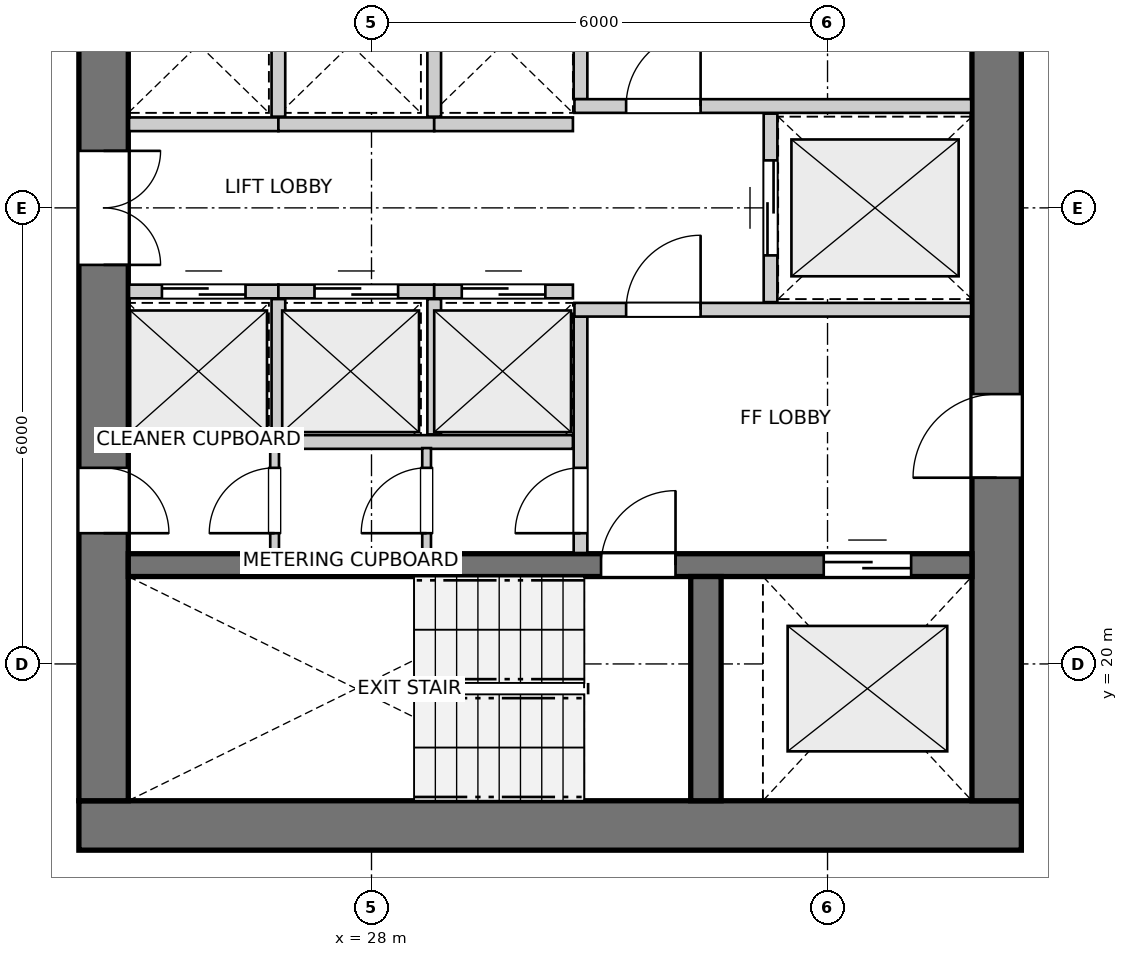
"""IFC4 building model, lengths in metres.
Left out: names, types, materials, properties, quantities, classifications, styles, units other than length and angle.
Written with IfcOpenShell. Run it as: python <this file> out.ifc"""

import sys

from ifc_helpers import new_model, si_unit, direction, frame, frame_2d, origin, place, context, subcontext, project, spatial, rectangle, extrude, source, transform, mapped, element, fill, save


model = new_model("IFC4")
c1 = context("Model", 3, precision=1e-05, world=origin(), true_north=direction((0.0, 1.0)))
c2 = subcontext(c1, "Body", "Model", "MODEL_VIEW")
j1 = project(units=[si_unit("LENGTHUNIT", "METRE"), si_unit("PLANEANGLEUNIT", "RADIAN")], contexts=[c1])
p1 = place(None, origin())
s1 = spatial("IfcSite", under=j1, at=p1, CompositionType="ELEMENT")
p2 = place(p1, origin())
s2 = spatial("IfcBuilding", under=s1, at=p2, CompositionType="ELEMENT")
p3 = place(p2, frame((0.0, 0.0, 121.6)))
s3 = spatial("IfcBuildingStorey", under=s2, at=p3, CompositionType="ELEMENT", Elevation=121.6)
p4 = place(p3, frame((24.15, 17.875, 0.0), z_axis=(0.0, 0.0, 1.0), x_axis=(1.0, 0.0, 0.0)))
e1 = element("IfcWall", 1, at=p4, inside=s3, PredefinedType="SHEAR", context=c2, shape_type="SweptSolid", body=[
    extrude(rectangle(XDim=12.4, YDim=0.65, at=frame_2d((6.2, 0.0))), origin(), (0.0, 0.0, 1.0), 2.95),
])
p5 = place(p3, frame((24.475, 33.8, 0.0), z_axis=(0.0, 0.0, 1.0), x_axis=(0.0, -1.0, 0.0)))
e2 = element("IfcWall", 2, at=p5, inside=s3, PredefinedType="SHEAR", context=c2, shape_type="SweptSolid", body=[
    extrude(rectangle(XDim=15.6, YDim=0.65, at=frame_2d((7.8, 0.0))), origin(), (0.0, 0.0, 1.0), 2.95),
])
p6 = place(p5, frame((7.05, 0.0, 0.0)))
e3 = element("IfcOpeningElement", 3, at=p6, cuts=e2, PredefinedType="OPENING", context=c2, shape_type="SweptSolid", body=[
    extrude(rectangle(XDim=1.5, YDim=2.15, at=frame_2d((0.75, 1.075))), frame((0.0, 0.335, 0.0), z_axis=(0.0, -1.0, 0.0), x_axis=(1.0, 0.0, 0.0)), (0.0, 0.0, 1.0), 0.67),
])
p7 = place(p5, frame((3.52, 0.0, 0.0)))
e4 = element("IfcOpeningElement", 4, at=p7, cuts=e2, PredefinedType="OPENING", context=c2, shape_type="SweptSolid", body=[
    extrude(rectangle(XDim=0.86, YDim=2.05, at=frame_2d((0.43, 1.025))), frame((0.0, 0.335, 0.0), z_axis=(0.0, -1.0, 0.0), x_axis=(1.0, 0.0, 0.0)), (0.0, 0.0, 1.0), 0.67),
])
p8 = place(p5, frame((11.22, 0.0, 0.0)))
e5 = element("IfcOpeningElement", 5, at=p8, cuts=e2, PredefinedType="OPENING", context=c2, shape_type="SweptSolid", body=[
    extrude(rectangle(XDim=0.86, YDim=2.05, at=frame_2d((0.43, 1.025))), frame((0.0, 0.335, 0.0), z_axis=(0.0, -1.0, 0.0), x_axis=(1.0, 0.0, 0.0)), (0.0, 0.0, 1.0), 0.67),
])
p9 = place(p3, frame((36.225, 18.2, 0.0), z_axis=(0.0, 0.0, 1.0), x_axis=(0.0, 1.0, 0.0)))
e6 = element("IfcWall", 6, at=p9, inside=s3, PredefinedType="SHEAR", context=c2, shape_type="SweptSolid", body=[
    extrude(rectangle(XDim=15.6, YDim=0.65, at=frame_2d((7.8, 0.0))), origin(), (0.0, 0.0, 1.0), 2.95),
])
p10 = place(p9, frame((4.25, 0.0, 0.0)))
e7 = element("IfcOpeningElement", 7, at=p10, cuts=e6, PredefinedType="OPENING", context=c2, shape_type="SweptSolid", body=[
    extrude(rectangle(XDim=1.1, YDim=2.15, at=frame_2d((0.55, 1.075))), frame((0.0, 0.335, 0.0), z_axis=(0.0, -1.0, 0.0), x_axis=(1.0, 0.0, 0.0)), (0.0, 0.0, 1.0), 0.67),
])
p11 = place(p9, frame((10.25, 0.0, 0.0)))
e8 = element("IfcOpeningElement", 8, at=p11, cuts=e6, PredefinedType="OPENING", context=c2, shape_type="SweptSolid", body=[
    extrude(rectangle(XDim=1.1, YDim=2.15, at=frame_2d((0.55, 1.075))), frame((0.0, 0.335, 0.0), z_axis=(0.0, -1.0, 0.0), x_axis=(1.0, 0.0, 0.0)), (0.0, 0.0, 1.0), 0.67),
])
p12 = place(p3, frame((24.8, 21.3, 0.0), z_axis=(0.0, 0.0, 1.0), x_axis=(1.0, 0.0, 0.0)))
e9 = element("IfcWall", 9, at=p12, inside=s3, PredefinedType="SHEAR", context=c2, shape_type="SweptSolid", body=[
    extrude(rectangle(XDim=11.1, YDim=0.3, at=frame_2d((5.55, 0.0))), origin(), (0.0, 0.0, 1.0), 2.95),
])
p13 = place(p12, frame((6.22, 0.0, 0.0)))
e10 = element("IfcOpeningElement", 10, at=p13, cuts=e9, PredefinedType="OPENING", context=c2, shape_type="SweptSolid", body=[
    extrude(rectangle(XDim=0.98, YDim=2.15, at=frame_2d((0.49, 1.075))), frame((0.0, 0.16, 0.0), z_axis=(0.0, -1.0, 0.0), x_axis=(1.0, 0.0, 0.0)), (0.0, 0.0, 1.0), 0.32),
])
p14 = place(p12, frame((9.15, 0.0, 0.0)))
e11 = element("IfcOpeningElement", 11, at=p14, cuts=e9, PredefinedType="OPENING", context=c2, shape_type="SweptSolid", body=[
    extrude(rectangle(XDim=1.15, YDim=2.15, at=frame_2d((0.575, 1.075))), frame((0.0, 0.16, 0.0), z_axis=(0.0, -1.0, 0.0), x_axis=(1.0, 0.0, 0.0)), (0.0, 0.0, 1.0), 0.32),
])
p15 = place(p3, frame((32.4, 18.2, 0.0), z_axis=(0.0, 0.0, 1.0), x_axis=(0.0, 1.0, 0.0)))
e12 = element("IfcWall", 12, at=p15, inside=s3, PredefinedType="SHEAR", context=c2, shape_type="SweptSolid", body=[
    extrude(rectangle(XDim=2.95, YDim=0.4, at=frame_2d((1.475, 0.0))), origin(), (0.0, 0.0, 1.0), 2.95),
])
p16 = place(p3, frame((30.75, 21.46, 0.0), z_axis=(0.0, 0.0, 1.0), x_axis=(0.0, 1.0, 0.0)))
e13 = element("IfcWall", 13, at=p16, inside=s3, PredefinedType="PARTITIONING", context=c2, shape_type="SweptSolid", body=[
    extrude(rectangle(XDim=3.11, YDim=0.18, at=frame_2d((1.555, 0.0))), origin(), (0.0, 0.0, 1.0), 2.95),
])
p17 = place(p16, frame((0.26, 0.0, 0.0)))
e14 = element("IfcOpeningElement", 14, at=p17, cuts=e13, PredefinedType="OPENING", context=c2, shape_type="SweptSolid", body=[
    extrude(rectangle(XDim=0.86, YDim=2.05, at=frame_2d((0.43, 1.025))), frame((0.0, 0.1, 0.0), z_axis=(0.0, -1.0, 0.0), x_axis=(1.0, 0.0, 0.0)), (0.0, 0.0, 1.0), 0.2),
])
p18 = place(p3, frame((30.67, 24.66, 0.0), z_axis=(0.0, 0.0, 1.0), x_axis=(1.0, 0.0, 0.0)))
e15 = element("IfcWall", 15, at=p18, inside=s3, PredefinedType="PARTITIONING", context=c2, shape_type="SweptSolid", body=[
    extrude(rectangle(XDim=5.22, YDim=0.18, at=frame_2d((2.61, 0.0))), origin(), (0.0, 0.0, 1.0), 2.95),
])
p19 = place(p18, frame((0.68, 0.0, 0.0)))
e16 = element("IfcOpeningElement", 16, at=p19, cuts=e15, PredefinedType="OPENING", context=c2, shape_type="SweptSolid", body=[
    extrude(rectangle(XDim=0.98, YDim=2.15, at=frame_2d((0.49, 1.075))), frame((0.0, 0.1, 0.0), z_axis=(0.0, -1.0, 0.0), x_axis=(1.0, 0.0, 0.0)), (0.0, 0.0, 1.0), 0.2),
])
p20 = place(p3, frame((30.75, 27.43, 0.0), z_axis=(0.0, 0.0, 1.0), x_axis=(0.0, 1.0, 0.0)))
e17 = element("IfcWall", 17, at=p20, inside=s3, PredefinedType="PARTITIONING", context=c2, shape_type="SweptSolid", body=[
    extrude(rectangle(XDim=3.11, YDim=0.18, at=frame_2d((1.555, 0.0))), origin(), (0.0, 0.0, 1.0), 2.95),
])
p21 = place(p20, frame((1.98, 0.0, 0.0)))
e18 = element("IfcOpeningElement", 18, at=p21, cuts=e17, PredefinedType="OPENING", context=c2, shape_type="SweptSolid", body=[
    extrude(rectangle(XDim=0.86, YDim=2.05, at=frame_2d((0.43, 1.025))), frame((0.0, 0.1, 0.0), z_axis=(0.0, -1.0, 0.0), x_axis=(1.0, 0.0, 0.0)), (0.0, 0.0, 1.0), 0.2),
])
p22 = place(p3, frame((30.67, 27.34, 0.0), z_axis=(0.0, 0.0, 1.0), x_axis=(1.0, 0.0, 0.0)))
e19 = element("IfcWall", 19, at=p22, inside=s3, PredefinedType="PARTITIONING", context=c2, shape_type="SweptSolid", body=[
    extrude(rectangle(XDim=5.22, YDim=0.18, at=frame_2d((2.61, 0.0))), origin(), (0.0, 0.0, 1.0), 2.95),
])
p23 = place(p22, frame((0.68, 0.0, 0.0)))
e20 = element("IfcOpeningElement", 20, at=p23, cuts=e19, PredefinedType="OPENING", context=c2, shape_type="SweptSolid", body=[
    extrude(rectangle(XDim=0.98, YDim=2.15, at=frame_2d((0.49, 1.075))), frame((0.0, 0.1, 0.0), z_axis=(0.0, -1.0, 0.0), x_axis=(1.0, 0.0, 0.0)), (0.0, 0.0, 1.0), 0.2),
])
p24 = place(p3, frame((33.25, 24.76, 0.0), z_axis=(0.0, 0.0, 1.0), x_axis=(0.0, 1.0, 0.0)))
e21 = element("IfcWall", 21, at=p24, inside=s3, PredefinedType="PARTITIONING", context=c2, shape_type="SweptSolid", body=[
    extrude(rectangle(XDim=2.48, YDim=0.18, at=frame_2d((1.24, 0.0))), origin(), (0.0, 0.0, 1.0), 2.95),
])
p25 = place(p24, frame((0.615, 0.0, 0.0)))
e22 = element("IfcOpeningElement", 22, at=p25, cuts=e21, PredefinedType="OPENING", context=c2, shape_type="SweptSolid", body=[
    extrude(rectangle(XDim=1.25, YDim=2.15, at=frame_2d((0.625, 1.075))), frame((0.0, 0.1, 0.0), z_axis=(0.0, -1.0, 0.0), x_axis=(1.0, 0.0, 0.0)), (0.0, 0.0, 1.0), 0.2),
])
p26 = place(p3, frame((24.81, 22.92, 0.0), z_axis=(0.0, 0.0, 1.0), x_axis=(1.0, 0.0, 0.0)))
e23 = element("IfcWall", 23, at=p26, inside=s3, PredefinedType="PARTITIONING", context=c2, shape_type="SweptSolid", body=[
    extrude(rectangle(XDim=5.84, YDim=0.18, at=frame_2d((2.92, 0.0))), origin(), (0.0, 0.0, 1.0), 2.95),
])
p27 = place(p3, frame((24.81, 24.9, 0.0), z_axis=(0.0, 0.0, 1.0), x_axis=(1.0, 0.0, 0.0)))
e24 = element("IfcWall", 24, at=p27, inside=s3, PredefinedType="PARTITIONING", context=c2, shape_type="SweptSolid", body=[
    extrude(rectangle(XDim=1.965, YDim=0.18, at=frame_2d((0.982, 0.0))), origin(), (0.0, 0.0, 1.0), 2.95),
])
p28 = place(p27, frame((0.433, 0.0, 0.0)))
e25 = element("IfcOpeningElement", 25, at=p28, cuts=e24, PredefinedType="OPENING", context=c2, shape_type="SweptSolid", body=[
    extrude(rectangle(XDim=1.1, YDim=2.15, at=frame_2d((0.55, 1.075))), frame((0.0, 0.1, 0.0), z_axis=(0.0, -1.0, 0.0), x_axis=(1.0, 0.0, 0.0)), (0.0, 0.0, 1.0), 0.2),
])
p29 = place(p3, frame((26.775, 24.9, 0.0), z_axis=(0.0, 0.0, 1.0), x_axis=(1.0, 0.0, 0.0)))
e26 = element("IfcWall", 26, at=p29, inside=s3, PredefinedType="PARTITIONING", context=c2, shape_type="SweptSolid", body=[
    extrude(rectangle(XDim=2.05, YDim=0.18, at=frame_2d((1.025, 0.0))), origin(), (0.0, 0.0, 1.0), 2.95),
])
p30 = place(p29, frame((0.475, 0.0, 0.0)))
e27 = element("IfcOpeningElement", 27, at=p30, cuts=e26, PredefinedType="OPENING", context=c2, shape_type="SweptSolid", body=[
    extrude(rectangle(XDim=1.1, YDim=2.15, at=frame_2d((0.55, 1.075))), frame((0.0, 0.1, 0.0), z_axis=(0.0, -1.0, 0.0), x_axis=(1.0, 0.0, 0.0)), (0.0, 0.0, 1.0), 0.2),
])
p31 = place(p3, frame((26.775, 23.02, 0.0), z_axis=(0.0, 0.0, 1.0), x_axis=(0.0, 1.0, 0.0)))
e28 = element("IfcWall", 28, at=p31, inside=s3, PredefinedType="PARTITIONING", context=c2, shape_type="SweptSolid", body=[
    extrude(rectangle(XDim=1.78, YDim=0.18, at=frame_2d((0.89, 0.0))), origin(), (0.0, 0.0, 1.0), 2.95),
])
p32 = place(p3, frame((28.825, 24.9, 0.0), z_axis=(0.0, 0.0, 1.0), x_axis=(1.0, 0.0, 0.0)))
e29 = element("IfcWall", 29, at=p32, inside=s3, PredefinedType="PARTITIONING", context=c2, shape_type="SweptSolid", body=[
    extrude(rectangle(XDim=1.825, YDim=0.18, at=frame_2d((0.913, 0.0))), origin(), (0.0, 0.0, 1.0), 2.95),
])
p33 = place(p32, frame((0.363, 0.0, 0.0)))
e30 = element("IfcOpeningElement", 30, at=p33, cuts=e29, PredefinedType="OPENING", context=c2, shape_type="SweptSolid", body=[
    extrude(rectangle(XDim=1.1, YDim=2.15, at=frame_2d((0.55, 1.075))), frame((0.0, 0.1, 0.0), z_axis=(0.0, -1.0, 0.0), x_axis=(1.0, 0.0, 0.0)), (0.0, 0.0, 1.0), 0.2),
])
p34 = place(p3, frame((28.825, 23.02, 0.0), z_axis=(0.0, 0.0, 1.0), x_axis=(0.0, 1.0, 0.0)))
e31 = element("IfcWall", 31, at=p34, inside=s3, PredefinedType="PARTITIONING", context=c2, shape_type="SweptSolid", body=[
    extrude(rectangle(XDim=1.78, YDim=0.18, at=frame_2d((0.89, 0.0))), origin(), (0.0, 0.0, 1.0), 2.95),
])
p35 = place(p3, frame((24.81, 27.1, 0.0), z_axis=(0.0, 0.0, 1.0), x_axis=(1.0, 0.0, 0.0)))
e32 = element("IfcWall", 32, at=p35, inside=s3, PredefinedType="PARTITIONING", context=c2, shape_type="SweptSolid", body=[
    extrude(rectangle(XDim=1.965, YDim=0.18, at=frame_2d((0.982, 0.0))), origin(), (0.0, 0.0, 1.0), 2.95),
])
p36 = place(p3, frame((26.775, 27.1, 0.0), z_axis=(0.0, 0.0, 1.0), x_axis=(1.0, 0.0, 0.0)))
e33 = element("IfcWall", 33, at=p36, inside=s3, PredefinedType="PARTITIONING", context=c2, shape_type="SweptSolid", body=[
    extrude(rectangle(XDim=2.05, YDim=0.18, at=frame_2d((1.025, 0.0))), origin(), (0.0, 0.0, 1.0), 2.95),
])
p37 = place(p3, frame((26.775, 27.2, 0.0), z_axis=(0.0, 0.0, 1.0), x_axis=(0.0, 1.0, 0.0)))
e34 = element("IfcWall", 34, at=p37, inside=s3, PredefinedType="PARTITIONING", context=c2, shape_type="SweptSolid", body=[
    extrude(rectangle(XDim=1.78, YDim=0.18, at=frame_2d((0.89, 0.0))), origin(), (0.0, 0.0, 1.0), 2.95),
])
p38 = place(p3, frame((28.825, 27.1, 0.0), z_axis=(0.0, 0.0, 1.0), x_axis=(1.0, 0.0, 0.0)))
e35 = element("IfcWall", 35, at=p38, inside=s3, PredefinedType="PARTITIONING", context=c2, shape_type="SweptSolid", body=[
    extrude(rectangle(XDim=1.825, YDim=0.18, at=frame_2d((0.913, 0.0))), origin(), (0.0, 0.0, 1.0), 2.95),
])
p39 = place(p3, frame((28.825, 27.2, 0.0), z_axis=(0.0, 0.0, 1.0), x_axis=(0.0, 1.0, 0.0)))
e36 = element("IfcWall", 36, at=p39, inside=s3, PredefinedType="PARTITIONING", context=c2, shape_type="SweptSolid", body=[
    extrude(rectangle(XDim=1.78, YDim=0.18, at=frame_2d((0.89, 0.0))), origin(), (0.0, 0.0, 1.0), 2.95),
])
p40 = place(p3, frame((26.725, 21.46, 0.0), z_axis=(0.0, 0.0, 1.0), x_axis=(0.0, 1.0, 0.0)))
e37 = element("IfcWall", 37, at=p40, inside=s3, PredefinedType="PARTITIONING", context=c2, shape_type="SweptSolid", body=[
    extrude(rectangle(XDim=1.38, YDim=0.115, at=frame_2d((0.69, 0.0))), origin(), (0.0, 0.0, 1.0), 2.95),
])
p41 = place(p40, frame((0.26, 0.0, 0.0)))
e38 = element("IfcOpeningElement", 38, at=p41, cuts=e37, PredefinedType="OPENING", context=c2, shape_type="SweptSolid", body=[
    extrude(rectangle(XDim=0.86, YDim=2.05, at=frame_2d((0.43, 1.025))), frame((0.0, 0.067, 0.0), z_axis=(0.0, -1.0, 0.0), x_axis=(1.0, 0.0, 0.0)), (0.0, 0.0, 1.0), 0.135),
])
p42 = place(p3, frame((28.725, 21.46, 0.0), z_axis=(0.0, 0.0, 1.0), x_axis=(0.0, 1.0, 0.0)))
e39 = element("IfcWall", 39, at=p42, inside=s3, PredefinedType="PARTITIONING", context=c2, shape_type="SweptSolid", body=[
    extrude(rectangle(XDim=1.38, YDim=0.115, at=frame_2d((0.69, 0.0))), origin(), (0.0, 0.0, 1.0), 2.95),
])
p43 = place(p42, frame((0.26, 0.0, 0.0)))
e40 = element("IfcOpeningElement", 40, at=p43, cuts=e39, PredefinedType="OPENING", context=c2, shape_type="SweptSolid", body=[
    extrude(rectangle(XDim=0.86, YDim=2.05, at=frame_2d((0.43, 1.025))), frame((0.0, 0.067, 0.0), z_axis=(0.0, -1.0, 0.0), x_axis=(1.0, 0.0, 0.0)), (0.0, 0.0, 1.0), 0.135),
])
m1 = source(origin(), c2, "Body", "SweptSolid", [
    extrude(rectangle(XDim=0.98, YDim=2.15, at=frame_2d((0.49, 1.075))), frame((0.0, 0.025, 0.0), z_axis=(0.0, -1.0, 0.0), x_axis=(1.0, 0.0, 0.0)), (0.0, 0.0, 1.0), 0.05),
])
p44 = place(p13, origin())
e41 = element("IfcDoor", 41, at=p44, inside=s3, OperationType="SINGLE_SWING_RIGHT", PredefinedType="DOOR", context=c2, shape_type="MappedRepresentation", body=[
    mapped(m1, transform((0.0, 0.0, 0.0), x_axis=(1.0, 0.0, 0.0), y_axis=(0.0, 1.0, 0.0), z_axis=(0.0, 0.0, 1.0), scale=1.0)),
])
fill(e10, e41)
m2 = source(origin(), c2, "Body", "SweptSolid", [
    extrude(rectangle(XDim=1.15, YDim=2.15, at=frame_2d((0.575, 1.075))), frame((0.0, 0.025, 0.0), z_axis=(0.0, -1.0, 0.0), x_axis=(1.0, 0.0, 0.0)), (0.0, 0.0, 1.0), 0.05),
])
p45 = place(p14, origin())
e42 = element("IfcDoor", 42, at=p45, inside=s3, OperationType="DOUBLE_DOOR_SLIDING", PredefinedType="DOOR", context=c2, shape_type="MappedRepresentation", body=[
    mapped(m2, transform((0.0, 0.0, 0.0), x_axis=(1.0, 0.0, 0.0), y_axis=(0.0, 1.0, 0.0), z_axis=(0.0, 0.0, 1.0), scale=1.0)),
])
fill(e11, e42)
m3 = source(origin(), c2, "Body", "SweptSolid", [
    extrude(rectangle(XDim=1.1, YDim=2.15, at=frame_2d((0.55, 1.075))), frame((0.0, 0.025, 0.0), z_axis=(0.0, -1.0, 0.0), x_axis=(1.0, 0.0, 0.0)), (0.0, 0.0, 1.0), 0.05),
])
p46 = place(p10, origin())
e43 = element("IfcDoor", 43, at=p46, inside=s3, OperationType="SINGLE_SWING_LEFT", PredefinedType="DOOR", context=c2, shape_type="MappedRepresentation", body=[
    mapped(m3, transform((0.0, 0.0, 0.0), x_axis=(1.0, 0.0, 0.0), y_axis=(0.0, 1.0, 0.0), z_axis=(0.0, 0.0, 1.0), scale=1.0)),
])
fill(e7, e43)
m4 = source(origin(), c2, "Body", "SweptSolid", [
    extrude(rectangle(XDim=1.5, YDim=2.15, at=frame_2d((0.75, 1.075))), frame((0.0, 0.025, 0.0), z_axis=(0.0, -1.0, 0.0), x_axis=(1.0, 0.0, 0.0)), (0.0, 0.0, 1.0), 0.05),
])
p47 = place(p6, origin())
e44 = element("IfcDoor", 44, at=p47, inside=s3, OperationType="DOUBLE_DOOR_SINGLE_SWING", PredefinedType="DOOR", context=c2, shape_type="MappedRepresentation", body=[
    mapped(m4, transform((0.0, 0.0, 0.0), x_axis=(1.0, 0.0, 0.0), y_axis=(0.0, 1.0, 0.0), z_axis=(0.0, 0.0, 1.0), scale=1.0)),
])
fill(e3, e44)
m5 = source(origin(), c2, "Body", "SweptSolid", [
    extrude(rectangle(XDim=0.86, YDim=2.05, at=frame_2d((0.43, 1.025))), frame((0.0, 0.025, 0.0), z_axis=(0.0, -1.0, 0.0), x_axis=(1.0, 0.0, 0.0)), (0.0, 0.0, 1.0), 0.05),
])
p48 = place(p8, origin())
e45 = element("IfcDoor", 45, at=p48, inside=s3, OperationType="SINGLE_SWING_RIGHT", PredefinedType="DOOR", context=c2, shape_type="MappedRepresentation", body=[
    mapped(m5, transform((0.0, 0.0, 0.0), x_axis=(1.0, 0.0, 0.0), y_axis=(0.0, 1.0, 0.0), z_axis=(0.0, 0.0, 1.0), scale=1.0)),
])
fill(e5, e45)
p49 = place(p17, origin())
e46 = element("IfcDoor", 46, at=p49, inside=s3, OperationType="SINGLE_SWING_LEFT", PredefinedType="DOOR", context=c2, shape_type="MappedRepresentation", body=[
    mapped(m5, transform((0.0, 0.0, 0.0), x_axis=(1.0, 0.0, 0.0), y_axis=(0.0, 1.0, 0.0), z_axis=(0.0, 0.0, 1.0), scale=1.0)),
])
fill(e14, e46)
p50 = place(p19, origin())
e47 = element("IfcDoor", 47, at=p50, inside=s3, OperationType="SINGLE_SWING_RIGHT", PredefinedType="DOOR", context=c2, shape_type="MappedRepresentation", body=[
    mapped(m1, transform((0.0, 0.0, 0.0), x_axis=(1.0, 0.0, 0.0), y_axis=(0.0, 1.0, 0.0), z_axis=(0.0, 0.0, 1.0), scale=1.0)),
])
fill(e16, e47)
p51 = place(p23, origin())
e48 = element("IfcDoor", 48, at=p51, inside=s3, OperationType="SINGLE_SWING_RIGHT", PredefinedType="DOOR", context=c2, shape_type="MappedRepresentation", body=[
    mapped(m1, transform((0.0, 0.0, 0.0), x_axis=(1.0, 0.0, 0.0), y_axis=(0.0, 1.0, 0.0), z_axis=(0.0, 0.0, 1.0), scale=1.0)),
])
fill(e20, e48)
m6 = source(origin(), c2, "Body", "SweptSolid", [
    extrude(rectangle(XDim=1.25, YDim=2.15, at=frame_2d((0.625, 1.075))), frame((0.0, 0.025, 0.0), z_axis=(0.0, -1.0, 0.0), x_axis=(1.0, 0.0, 0.0)), (0.0, 0.0, 1.0), 0.05),
])
p52 = place(p25, origin())
e49 = element("IfcDoor", 49, at=p52, inside=s3, OperationType="DOUBLE_DOOR_SLIDING", PredefinedType="DOOR", context=c2, shape_type="MappedRepresentation", body=[
    mapped(m6, transform((0.0, 0.0, 0.0), x_axis=(1.0, 0.0, 0.0), y_axis=(0.0, 1.0, 0.0), z_axis=(0.0, 0.0, 1.0), scale=1.0)),
])
fill(e22, e49)
p53 = place(p28, origin())
e50 = element("IfcDoor", 50, at=p53, inside=s3, OperationType="DOUBLE_DOOR_SLIDING", PredefinedType="DOOR", context=c2, shape_type="MappedRepresentation", body=[
    mapped(m3, transform((0.0, 0.0, 0.0), x_axis=(1.0, 0.0, 0.0), y_axis=(0.0, 1.0, 0.0), z_axis=(0.0, 0.0, 1.0), scale=1.0)),
])
fill(e25, e50)
p54 = place(p30, origin())
e51 = element("IfcDoor", 51, at=p54, inside=s3, OperationType="DOUBLE_DOOR_SLIDING", PredefinedType="DOOR", context=c2, shape_type="MappedRepresentation", body=[
    mapped(m3, transform((0.0, 0.0, 0.0), x_axis=(1.0, 0.0, 0.0), y_axis=(0.0, 1.0, 0.0), z_axis=(0.0, 0.0, 1.0), scale=1.0)),
])
fill(e27, e51)
p55 = place(p33, origin())
e52 = element("IfcDoor", 52, at=p55, inside=s3, OperationType="DOUBLE_DOOR_SLIDING", PredefinedType="DOOR", context=c2, shape_type="MappedRepresentation", body=[
    mapped(m3, transform((0.0, 0.0, 0.0), x_axis=(1.0, 0.0, 0.0), y_axis=(0.0, 1.0, 0.0), z_axis=(0.0, 0.0, 1.0), scale=1.0)),
])
fill(e30, e52)
p56 = place(p41, origin())
e53 = element("IfcDoor", 53, at=p56, inside=s3, OperationType="SINGLE_SWING_LEFT", PredefinedType="DOOR", context=c2, shape_type="MappedRepresentation", body=[
    mapped(m5, transform((0.0, 0.0, 0.0), x_axis=(1.0, 0.0, 0.0), y_axis=(0.0, 1.0, 0.0), z_axis=(0.0, 0.0, 1.0), scale=1.0)),
])
fill(e38, e53)
p57 = place(p43, origin())
e54 = element("IfcDoor", 54, at=p57, inside=s3, OperationType="SINGLE_SWING_LEFT", PredefinedType="DOOR", context=c2, shape_type="MappedRepresentation", body=[
    mapped(m5, transform((0.0, 0.0, 0.0), x_axis=(1.0, 0.0, 0.0), y_axis=(0.0, 1.0, 0.0), z_axis=(0.0, 0.0, 1.0), scale=1.0)),
])
fill(e40, e54)
save(model, sys.argv[1])
